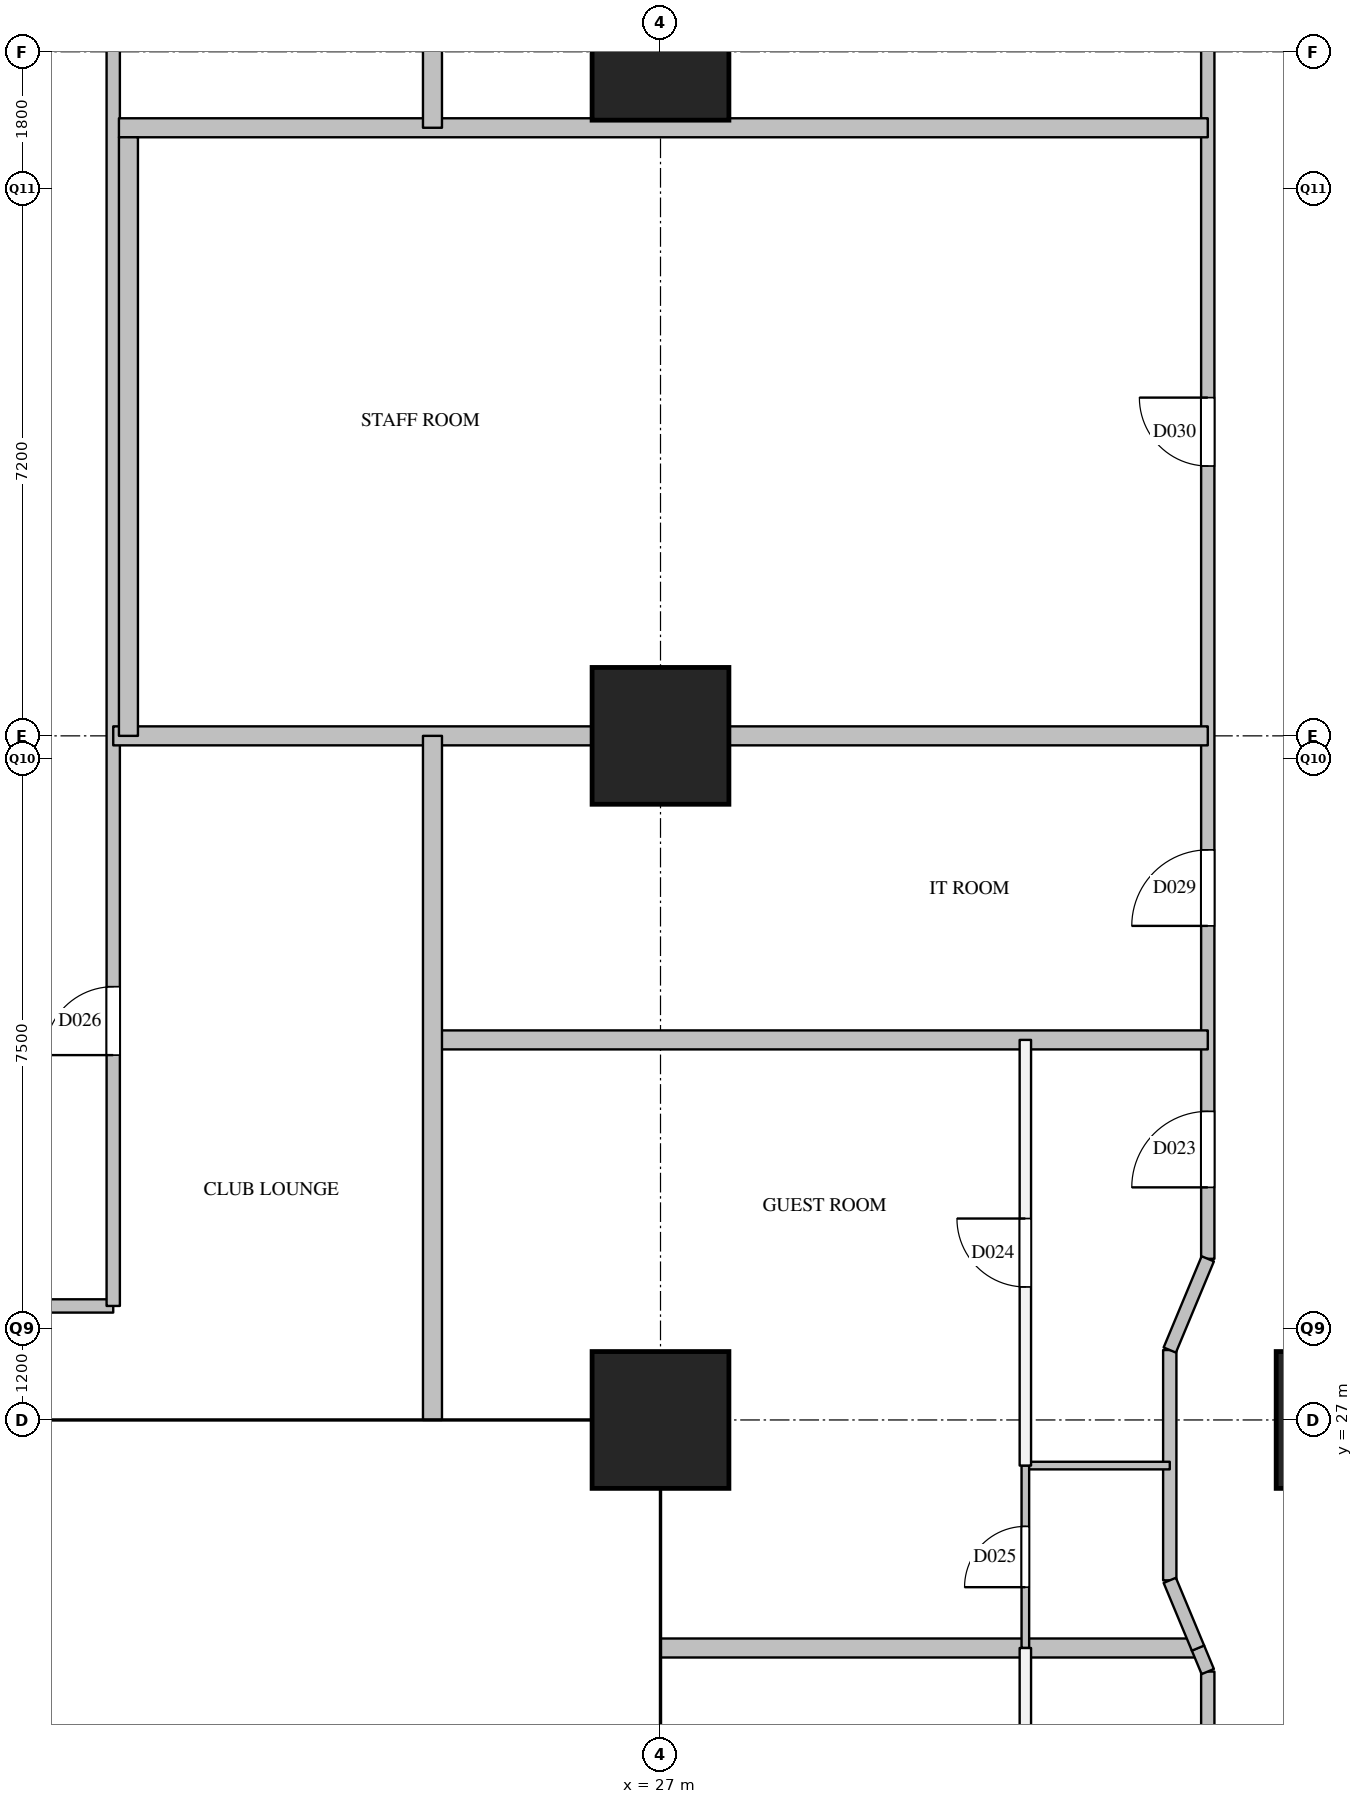
"""IFC4 building model, lengths in metres.
Left out: names, types, materials, properties, quantities, classifications, styles, units other than length and angle.
Written with IfcOpenShell. Run it as: python <this file> out.ifc"""

import sys

from ifc_helpers import new_model, si_unit, direction, frame, frame_2d, origin, origin_2d, place, context, subcontext, project, spatial, rectangle, extrude, element, fill, save


model = new_model("IFC4")
c1 = context("Model", 3, precision=1e-05, world=origin(), true_north=direction((0.0, 1.0)))
c2 = subcontext(c1, "Body", "Model", "MODEL_VIEW")
j1 = project(units=[si_unit("LENGTHUNIT", "METRE"), si_unit("PLANEANGLEUNIT", "RADIAN")], contexts=[c1])
p1 = place(None, origin())
s1 = spatial("IfcSite", under=j1, at=p1, CompositionType="ELEMENT")
p2 = place(p1, origin())
s2 = spatial("IfcBuilding", under=s1, at=p2, CompositionType="ELEMENT")
p3 = place(p2, frame((0.0, 0.0, 108.2)))
s3 = spatial("IfcBuildingStorey", under=s2, at=p3, CompositionType="ELEMENT", Elevation=108.2)
for number, where, z_axis, x_axis in (
    (1, (27.0, 27.0, 0.0), (0.0, 0.0, 1.0), (1.0, 0.0, 0.0)),
    (2, (27.0, 36.0, 0.0), (0.0, 0.0, 1.0), (1.0, 0.0, 0.0)),
    (3, (27.0, 45.0, 0.0), (0.0, 0.0, 1.0), (1.0, 0.0, 0.0)),
    (4, (36.0, 27.0, 0.0), (0.0, 0.0, 1.0), (1.0, 0.0, 0.0)),
):
    element("IfcColumn", number, at=place(p3, frame(where, z_axis=z_axis, x_axis=x_axis)), inside=s3, PredefinedType="COLUMN", context=c2, shape_type="SweptSolid", body=[
        extrude(rectangle(XDim=1.8, YDim=1.8, at=origin_2d()), origin(), (0.0, 0.0, 1.0), 3.8),
    ])
p4 = place(p3, frame((18.0, 28.5, 0.0), z_axis=(0.0, 0.0, 1.0), x_axis=(1.0, 0.0, 0.0)))
e5 = element("IfcWall", 5, at=p4, inside=s3, PredefinedType="PARTITIONING", context=c2, shape_type="SweptSolid", body=[
    extrude(rectangle(XDim=1.8, YDim=0.175, at=frame_2d((0.9, 0.0))), origin(), (0.0, 0.0, 1.0), 3.5),
])
p5 = place(p3, frame((19.8, 28.5, 0.0), z_axis=(0.0, 0.0, 1.0), x_axis=(0.0, 1.0, 0.0)))
e6 = element("IfcWall", 6, at=p5, inside=s3, PredefinedType="PARTITIONING", context=c2, shape_type="SweptSolid", body=[
    extrude(rectangle(XDim=23.3, YDim=0.175, at=frame_2d((11.65, 0.0))), origin(), (0.0, 0.0, 1.0), 3.5),
])
p6 = place(p5, frame((3.3, 0.0, 0.0)))
e7 = element("IfcOpeningElement", 7, at=p6, cuts=e6, PredefinedType="OPENING", context=c2, shape_type="SweptSolid", body=[
    extrude(rectangle(XDim=0.9, YDim=2.1, at=frame_2d((0.45, 1.05))), frame((0.0, 0.097, 0.0), z_axis=(0.0, -1.0, 0.0), x_axis=(1.0, 0.0, 0.0)), (0.0, 0.0, 1.0), 0.195),
])
p7 = place(p5, frame((17.83, 0.0, 0.0)))
e8 = element("IfcOpeningElement", 8, at=p7, cuts=e6, PredefinedType="OPENING", context=c2, shape_type="SweptSolid", body=[
    extrude(rectangle(XDim=0.9, YDim=2.1, at=frame_2d((0.45, 1.05))), frame((0.0, 0.097, 0.0), z_axis=(0.0, -1.0, 0.0), x_axis=(1.0, 0.0, 0.0)), (0.0, 0.0, 1.0), 0.195),
])
p8 = place(p3, frame((33.7, 24.89, 0.0), z_axis=(0.0, 0.0, 1.0), x_axis=(0.0, 1.0, 0.0)))
e9 = element("IfcWall", 9, at=p8, inside=s3, PredefinedType="PARTITIONING", context=c2, shape_type="SweptSolid", body=[
    extrude(rectangle(XDim=3.03, YDim=0.175, at=frame_2d((1.515, 0.0))), origin(), (0.0, 0.0, 1.0), 2.5),
])
p9 = place(p3, frame((34.2, 7.2, 0.0), z_axis=(0.0, 0.0, 1.0), x_axis=(0.0, 1.0, 0.0)))
e10 = element("IfcWall", 10, at=p9, inside=s3, PredefinedType="PARTITIONING", context=c2, shape_type="SweptSolid", body=[
    extrude(rectangle(XDim=16.49, YDim=0.175, at=frame_2d((8.245, 0.0))), origin(), (0.0, 0.0, 1.0), 3.5),
])
p10 = place(p9, frame((5.5, 0.0, 0.0)))
e11 = element("IfcOpeningElement", 11, at=p10, cuts=e10, PredefinedType="OPENING", context=c2, shape_type="SweptSolid", body=[
    extrude(rectangle(XDim=1.0, YDim=2.1, at=frame_2d((0.5, 1.05))), frame((0.0, 0.097, 0.0), z_axis=(0.0, -1.0, 0.0), x_axis=(1.0, 0.0, 0.0)), (0.0, 0.0, 1.0), 0.195),
])
p11 = place(p9, frame((13.345, 0.0, 0.0)))
e12 = element("IfcOpeningElement", 12, at=p11, cuts=e10, PredefinedType="OPENING", context=c2, shape_type="SweptSolid", body=[
    extrude(rectangle(XDim=1.0, YDim=2.1, at=frame_2d((0.5, 1.05))), frame((0.0, 0.097, 0.0), z_axis=(0.0, -1.0, 0.0), x_axis=(1.0, 0.0, 0.0)), (0.0, 0.0, 1.0), 0.195),
])
p12 = place(p3, frame((34.2, 29.12, 0.0), z_axis=(0.0, 0.0, 1.0), x_axis=(0.0, 1.0, 0.0)))
e13 = element("IfcWall", 13, at=p12, inside=s3, PredefinedType="PARTITIONING", context=c2, shape_type="SweptSolid", body=[
    extrude(rectangle(XDim=22.68, YDim=0.175, at=frame_2d((11.34, 0.0))), origin(), (0.0, 0.0, 1.0), 3.5),
])
p13 = place(p12, frame((0.94, 0.0, 0.0)))
e14 = element("IfcOpeningElement", 14, at=p13, cuts=e13, PredefinedType="OPENING", context=c2, shape_type="SweptSolid", body=[
    extrude(rectangle(XDim=1.0, YDim=2.1, at=frame_2d((0.5, 1.05))), frame((0.0, 0.097, 0.0), z_axis=(0.0, -1.0, 0.0), x_axis=(1.0, 0.0, 0.0)), (0.0, 0.0, 1.0), 0.195),
])
p14 = place(p12, frame((4.38, 0.0, 0.0)))
e15 = element("IfcOpeningElement", 15, at=p14, cuts=e13, PredefinedType="OPENING", context=c2, shape_type="SweptSolid", body=[
    extrude(rectangle(XDim=1.0, YDim=2.1, at=frame_2d((0.5, 1.05))), frame((0.0, 0.097, 0.0), z_axis=(0.0, -1.0, 0.0), x_axis=(1.0, 0.0, 0.0)), (0.0, 0.0, 1.0), 0.195),
])
p15 = place(p12, frame((10.43, 0.0, 0.0)))
e16 = element("IfcOpeningElement", 16, at=p15, cuts=e13, PredefinedType="OPENING", context=c2, shape_type="SweptSolid", body=[
    extrude(rectangle(XDim=0.9, YDim=2.1, at=frame_2d((0.45, 1.05))), frame((0.0, 0.097, 0.0), z_axis=(0.0, -1.0, 0.0), x_axis=(1.0, 0.0, 0.0)), (0.0, 0.0, 1.0), 0.195),
])
p16 = place(p12, frame((18.33, 0.0, 0.0)))
e17 = element("IfcOpeningElement", 17, at=p16, cuts=e13, PredefinedType="OPENING", context=c2, shape_type="SweptSolid", body=[
    extrude(rectangle(XDim=0.9, YDim=2.1, at=frame_2d((0.45, 1.05))), frame((0.0, 0.097, 0.0), z_axis=(0.0, -1.0, 0.0), x_axis=(1.0, 0.0, 0.0)), (0.0, 0.0, 1.0), 0.195),
])
p17 = place(p3, frame((31.8, 18.4, 0.0), z_axis=(0.0, 0.0, 1.0), x_axis=(0.0, 1.0, 0.0)))
e18 = element("IfcWall", 18, at=p17, inside=s3, PredefinedType="PARTITIONING", context=c2, shape_type="SweptSolid", body=[
    extrude(rectangle(XDim=5.6, YDim=0.15, at=frame_2d((2.8, 0.0))), origin(), (0.0, 0.0, 1.0), 3.5),
])
p18 = place(p17, frame((2.35, 0.0, 0.0)))
e19 = element("IfcOpeningElement", 19, at=p18, cuts=e18, PredefinedType="OPENING", context=c2, shape_type="SweptSolid", body=[
    extrude(rectangle(XDim=0.9, YDim=2.1, at=frame_2d((0.45, 1.05))), frame((0.0, 0.085, 0.0), z_axis=(0.0, -1.0, 0.0), x_axis=(1.0, 0.0, 0.0)), (0.0, 0.0, 1.0), 0.17),
])
p19 = place(p3, frame((31.8, 26.4, 0.0), z_axis=(0.0, 0.0, 1.0), x_axis=(0.0, 1.0, 0.0)))
e20 = element("IfcWall", 20, at=p19, inside=s3, PredefinedType="PARTITIONING", context=c2, shape_type="SweptSolid", body=[
    extrude(rectangle(XDim=5.6, YDim=0.15, at=frame_2d((2.8, 0.0))), origin(), (0.0, 0.0, 1.0), 2.5),
])
p20 = place(p19, frame((2.35, 0.0, 0.0)))
e21 = element("IfcOpeningElement", 21, at=p20, cuts=e20, PredefinedType="OPENING", context=c2, shape_type="SweptSolid", body=[
    extrude(rectangle(XDim=0.9, YDim=2.1, at=frame_2d((0.45, 1.05))), frame((0.0, 0.085, 0.0), z_axis=(0.0, -1.0, 0.0), x_axis=(1.0, 0.0, 0.0)), (0.0, 0.0, 1.0), 0.17),
])
p21 = place(p3, frame((27.0, 24.0, 0.0), z_axis=(0.0, 0.0, 1.0), x_axis=(1.0, 0.0, 0.0)))
e22 = element("IfcWall", 22, at=p21, inside=s3, PredefinedType="PARTITIONING", context=c2, shape_type="SweptSolid", body=[
    extrude(rectangle(XDim=7.071, YDim=0.25, at=frame_2d((3.535, 0.0))), origin(), (0.0, 0.0, 1.0), 2.5),
])
p22 = place(p3, frame((24.0, 32.0, 0.0), z_axis=(0.0, 0.0, 1.0), x_axis=(1.0, 0.0, 0.0)))
e23 = element("IfcWall", 23, at=p22, inside=s3, PredefinedType="PARTITIONING", context=c2, shape_type="SweptSolid", body=[
    extrude(rectangle(XDim=10.2, YDim=0.25, at=frame_2d((5.1, 0.0))), origin(), (0.0, 0.0, 1.0), 2.5),
])
p23 = place(p3, frame((19.8, 36.0, 0.0), z_axis=(0.0, 0.0, 1.0), x_axis=(1.0, 0.0, 0.0)))
e24 = element("IfcWall", 24, at=p23, inside=s3, PredefinedType="PARTITIONING", context=c2, shape_type="SweptSolid", body=[
    extrude(rectangle(XDim=14.4, YDim=0.25, at=frame_2d((7.2, 0.0))), origin(), (0.0, 0.0, 1.0), 3.5),
])
p24 = place(p3, frame((19.875, 44.0, 0.0), z_axis=(0.0, 0.0, 1.0), x_axis=(1.0, 0.0, 0.0)))
e25 = element("IfcWall", 25, at=p24, inside=s3, PredefinedType="PARTITIONING", context=c2, shape_type="SweptSolid", body=[
    extrude(rectangle(XDim=14.325, YDim=0.25, at=frame_2d((7.163, 0.0))), origin(), (0.0, 0.0, 1.0), 2.5),
])
p25 = place(p3, frame((20.0, 36.0, 0.0), z_axis=(0.0, 0.0, 1.0), x_axis=(0.0, 1.0, 0.0)))
e26 = element("IfcWall", 26, at=p25, inside=s3, PredefinedType="PARTITIONING", context=c2, shape_type="SweptSolid", body=[
    extrude(rectangle(XDim=7.875, YDim=0.25, at=frame_2d((3.938, 0.0))), origin(), (0.0, 0.0, 1.0), 3.5),
])
p26 = place(p3, frame((24.0, 27.0, 0.0), z_axis=(0.0, 0.0, 1.0), x_axis=(0.0, 1.0, 0.0)))
e27 = element("IfcWall", 27, at=p26, inside=s3, PredefinedType="PARTITIONING", context=c2, shape_type="SweptSolid", body=[
    extrude(rectangle(XDim=9.0, YDim=0.25, at=frame_2d((4.5, 0.0))), origin(), (0.0, 0.0, 1.0), 2.5),
])
p27 = place(p3, frame((24.0, 44.0, 0.0), z_axis=(0.0, 0.0, 1.0), x_axis=(0.0, 1.0, 0.0)))
e28 = element("IfcWall", 28, at=p27, inside=s3, PredefinedType="PARTITIONING", context=c2, shape_type="SweptSolid", body=[
    extrude(rectangle(XDim=10.0, YDim=0.25, at=frame_2d((5.0, 0.0))), origin(), (0.0, 0.0, 1.0), 2.5),
])
p28 = place(p3, frame((31.8, 26.4, 0.0), z_axis=(0.0, 0.0, 1.0), x_axis=(1.0, 0.0, 0.0)))
e29 = element("IfcWall", 29, at=p28, inside=s3, PredefinedType="PARTITIONING", context=c2, shape_type="SweptSolid", body=[
    extrude(rectangle(XDim=1.9, YDim=0.1, at=frame_2d((0.95, 0.0))), origin(), (0.0, 0.0, 1.0), 3.5),
])
p29 = place(p3, frame((31.8, 24.0, 0.0), z_axis=(0.0, 0.0, 1.0), x_axis=(0.0, 1.0, 0.0)))
e30 = element("IfcWall", 30, at=p29, inside=s3, PredefinedType="PARTITIONING", context=c2, shape_type="SweptSolid", body=[
    extrude(rectangle(XDim=2.4, YDim=0.1, at=frame_2d((1.2, 0.0))), origin(), (0.0, 0.0, 1.0), 3.5),
])
p30 = place(p29, frame((0.8, 0.0, 0.0)))
e31 = element("IfcOpeningElement", 31, at=p30, cuts=e30, PredefinedType="OPENING", context=c2, shape_type="SweptSolid", body=[
    extrude(rectangle(XDim=0.8, YDim=2.1, at=frame_2d((0.4, 1.05))), frame((0.0, 0.06, 0.0), z_axis=(0.0, -1.0, 0.0), x_axis=(1.0, 0.0, 0.0)), (0.0, 0.0, 1.0), 0.12),
])
p31 = place(p3, frame((34.2, 23.69, 0.0), z_axis=(0.0, 0.0, 1.0), x_axis=(-0.384307602557, 0.92320510539, 0.0)))
e32 = element("IfcWall", 32, at=p31, inside=s3, PredefinedType="PARTITIONING", context=c2, shape_type="SweptSolid", body=[
    extrude(rectangle(XDim=0.338, YDim=0.175, at=frame_2d((0.169, 0.0))), origin(), (0.0, 0.0, 1.0), 3.5),
])
p32 = place(p3, frame((33.7, 27.92, 0.0), z_axis=(0.0, 0.0, 1.0), x_axis=(0.384562051588, 0.923099143363, 0.0)))
e33 = element("IfcWall", 33, at=p32, inside=s3, PredefinedType="PARTITIONING", context=c2, shape_type="SweptSolid", body=[
    extrude(rectangle(XDim=1.3, YDim=0.175, at=frame_2d((0.65, 0.0))), origin(), (0.0, 0.0, 1.0), 3.5),
])
p33 = place(p3, frame((34.072, 23.998, 0.0), z_axis=(0.0, 0.0, 1.0), x_axis=(-0.384687170746, 0.923047008913, 0.0)))
e34 = element("IfcWall", 34, at=p33, inside=s3, PredefinedType="PARTITIONING", context=c2, shape_type="SweptSolid", body=[
    extrude(rectangle(XDim=0.966, YDim=0.175, at=frame_2d((0.483, 0.0))), origin(), (0.0, 0.0, 1.0), 3.5),
])
p34 = place(p13, origin())
e35 = element("IfcDoor", 35, at=p34, inside=s3, OperationType="SINGLE_SWING_LEFT", PredefinedType="DOOR", context=c2, shape_type="SweptSolid", body=[
    extrude(rectangle(XDim=1.0, YDim=2.1, at=frame_2d((0.5, 1.05))), frame((0.0, 0.025, 0.0), z_axis=(0.0, -1.0, 0.0), x_axis=(1.0, 0.0, 0.0)), (0.0, 0.0, 1.0), 0.05),
])
fill(e14, e35)
p35 = place(p20, origin())
e36 = element("IfcDoor", 36, at=p35, inside=s3, OperationType="SINGLE_SWING_RIGHT", PredefinedType="DOOR", context=c2, shape_type="SweptSolid", body=[
    extrude(rectangle(XDim=0.9, YDim=2.1, at=frame_2d((0.45, 1.05))), frame((0.0, 0.025, 0.0), z_axis=(0.0, -1.0, 0.0), x_axis=(1.0, 0.0, 0.0)), (0.0, 0.0, 1.0), 0.05),
])
fill(e21, e36)
p36 = place(p30, origin())
e37 = element("IfcDoor", 37, at=p36, inside=s3, OperationType="SINGLE_SWING_LEFT", PredefinedType="DOOR", context=c2, shape_type="SweptSolid", body=[
    extrude(rectangle(XDim=0.8, YDim=2.1, at=frame_2d((0.4, 1.05))), frame((0.0, 0.025, 0.0), z_axis=(0.0, -1.0, 0.0), x_axis=(1.0, 0.0, 0.0)), (0.0, 0.0, 1.0), 0.05),
])
fill(e31, e37)
p37 = place(p6, origin())
e38 = element("IfcDoor", 38, at=p37, inside=s3, OperationType="SINGLE_SWING_LEFT", PredefinedType="DOOR", context=c2, shape_type="SweptSolid", body=[
    extrude(rectangle(XDim=0.9, YDim=2.1, at=frame_2d((0.45, 1.05))), frame((0.0, 0.025, 0.0), z_axis=(0.0, -1.0, 0.0), x_axis=(1.0, 0.0, 0.0)), (0.0, 0.0, 1.0), 0.05),
])
fill(e7, e38)
p38 = place(p14, origin())
e39 = element("IfcDoor", 39, at=p38, inside=s3, OperationType="SINGLE_SWING_LEFT", PredefinedType="DOOR", context=c2, shape_type="SweptSolid", body=[
    extrude(rectangle(XDim=1.0, YDim=2.1, at=frame_2d((0.5, 1.05))), frame((0.0, 0.025, 0.0), z_axis=(0.0, -1.0, 0.0), x_axis=(1.0, 0.0, 0.0)), (0.0, 0.0, 1.0), 0.05),
])
fill(e15, e39)
p39 = place(p15, origin())
e40 = element("IfcDoor", 40, at=p39, inside=s3, OperationType="SINGLE_SWING_RIGHT", PredefinedType="DOOR", context=c2, shape_type="SweptSolid", body=[
    extrude(rectangle(XDim=0.9, YDim=2.1, at=frame_2d((0.45, 1.05))), frame((0.0, 0.025, 0.0), z_axis=(0.0, -1.0, 0.0), x_axis=(1.0, 0.0, 0.0)), (0.0, 0.0, 1.0), 0.05),
])
fill(e16, e40)
save(model, sys.argv[1])
